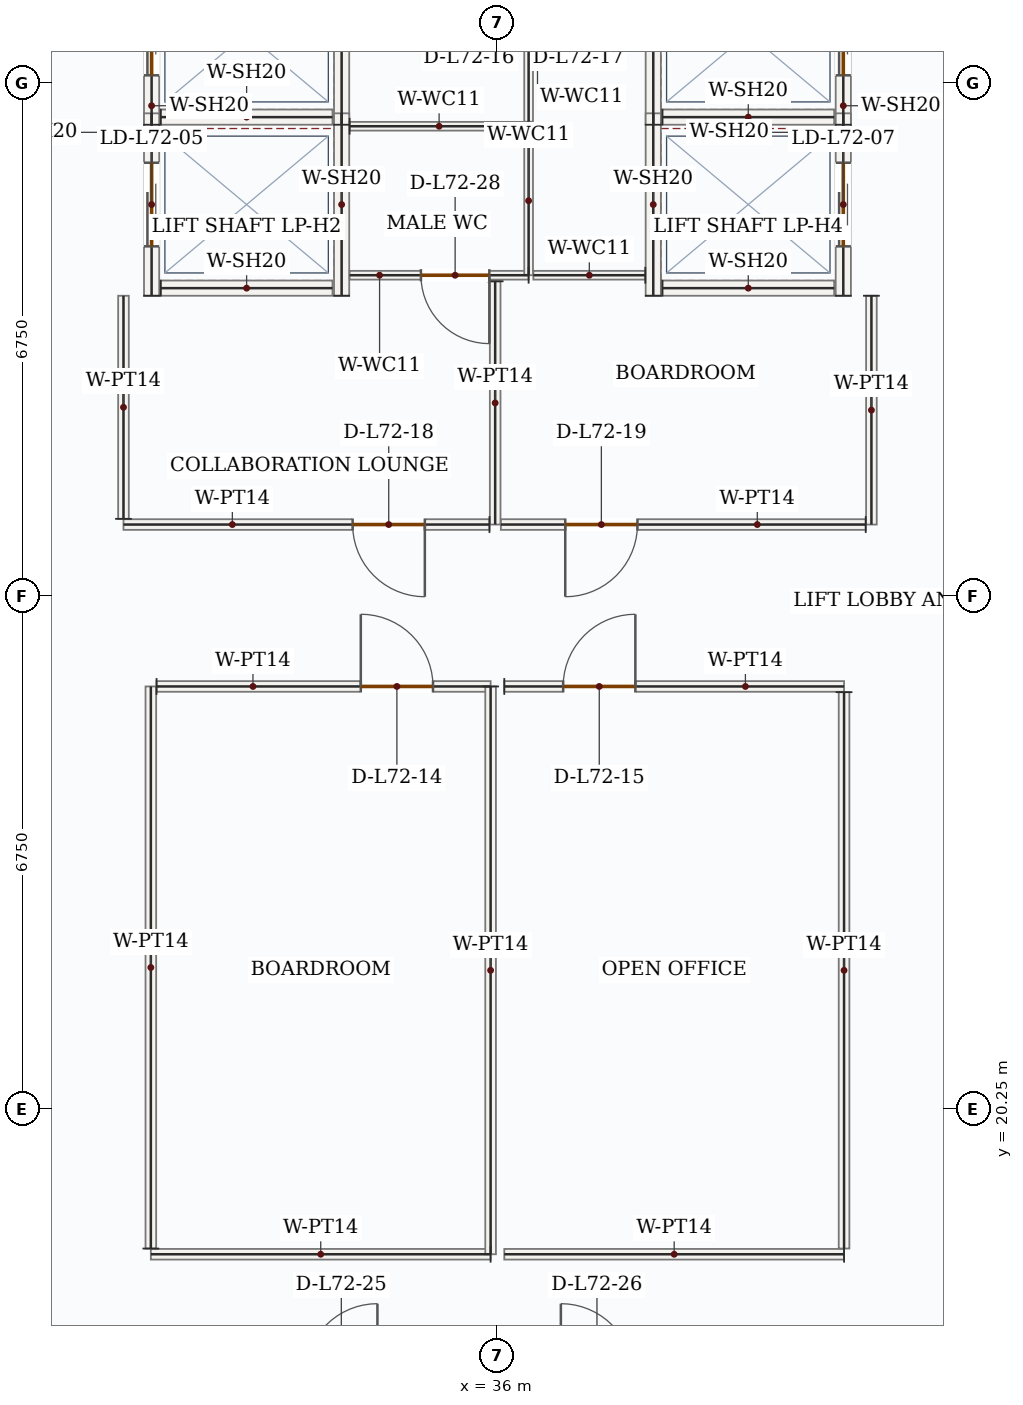
"""IFC4 building model, lengths in metres.
Left out: names, types, materials, properties, quantities, classifications, styles, units other than length and angle.
Written with IfcOpenShell. Run it as: python <this file> out.ifc"""

import sys

from ifc_helpers import new_model, si_unit, direction, frame, frame_2d, origin, place, context, subcontext, project, spatial, rectangle, extrude, source, transform, mapped, element, fill, save


model = new_model("IFC4")
c1 = context("Model", 3, precision=1e-05, world=origin(), true_north=direction((0.0, 1.0)))
c2 = subcontext(c1, "Body", "Model", "MODEL_VIEW")
j1 = project(units=[si_unit("LENGTHUNIT", "METRE"), si_unit("PLANEANGLEUNIT", "RADIAN")], contexts=[c1])
p1 = place(None, origin())
s1 = spatial("IfcSite", under=j1, at=p1, CompositionType="ELEMENT")
p2 = place(p1, origin())
s2 = spatial("IfcBuilding", under=s1, at=p2, CompositionType="ELEMENT")
p3 = place(p2, frame((0.0, 0.0, 299.1)))
s3 = spatial("IfcBuildingStorey", under=s2, at=p3, CompositionType="ELEMENT", Elevation=299.1)
p4 = place(p3, frame((31.45, 33.2, 0.0), z_axis=(0.0, 0.0, 1.0), x_axis=(0.0, 1.0, 0.0)))
e1 = element("IfcWall", 1, at=p4, inside=s3, PredefinedType="SOLIDWALL", context=c2, shape_type="SweptSolid", body=[
    extrude(rectangle(XDim=2.4, YDim=0.2, at=frame_2d((1.2, 0.0))), origin(), (0.0, 0.0, 1.0), 3.5),
])
p5 = place(p4, frame((0.65, 0.0, 0.0)))
e2 = element("IfcOpeningElement", 2, at=p5, cuts=e1, PredefinedType="OPENING", context=c2, shape_type="SweptSolid", body=[
    extrude(rectangle(XDim=1.1, YDim=2.15, at=frame_2d((0.55, 1.075))), frame((0.0, 0.11, 0.0), z_axis=(0.0, -1.0, 0.0), x_axis=(1.0, 0.0, 0.0)), (0.0, 0.0, 1.0), 0.22),
])
m1 = source(origin(), c2, "Body", "SweptSolid", [
    extrude(rectangle(XDim=2.4, YDim=0.2, at=frame_2d((1.2, 0.0))), origin(), (0.0, 0.0, 1.0), 3.5),
])
p6 = place(p3, frame((33.95, 33.2, 0.0), z_axis=(0.0, 0.0, 1.0), x_axis=(0.0, 1.0, 0.0)))
e3 = element("IfcWall", 3, at=p6, inside=s3, PredefinedType="SOLIDWALL", context=c2, shape_type="MappedRepresentation", body=[
    mapped(m1, transform((0.0, 0.0, 0.0), x_axis=(1.0, 0.0, 0.0), y_axis=(0.0, 1.0, 0.0), z_axis=(0.0, 0.0, 1.0), scale=1.0)),
])
m2 = source(origin(), c2, "Body", "SweptSolid", [
    extrude(rectangle(XDim=2.26, YDim=0.2, at=frame_2d((1.13, 0.0))), origin(), (0.0, 0.0, 1.0), 3.5),
])
p7 = place(p3, frame((31.57, 33.3, 0.0), z_axis=(0.0, 0.0, 1.0), x_axis=(1.0, 0.0, 0.0)))
e4 = element("IfcWall", 4, at=p7, inside=s3, PredefinedType="SOLIDWALL", context=c2, shape_type="MappedRepresentation", body=[
    mapped(m2, transform((0.0, 0.0, 0.0), x_axis=(1.0, 0.0, 0.0), y_axis=(0.0, 1.0, 0.0), z_axis=(0.0, 0.0, 1.0), scale=1.0)),
])
p8 = place(p3, frame((31.45, 30.95, 0.0), z_axis=(0.0, 0.0, 1.0), x_axis=(0.0, 1.0, 0.0)))
e5 = element("IfcWall", 5, at=p8, inside=s3, PredefinedType="SOLIDWALL", context=c2, shape_type="SweptSolid", body=[
    extrude(rectangle(XDim=2.4, YDim=0.2, at=frame_2d((1.2, 0.0))), origin(), (0.0, 0.0, 1.0), 3.5),
])
p9 = place(p8, frame((0.65, 0.0, 0.0)))
e6 = element("IfcOpeningElement", 6, at=p9, cuts=e5, PredefinedType="OPENING", context=c2, shape_type="SweptSolid", body=[
    extrude(rectangle(XDim=1.1, YDim=2.15, at=frame_2d((0.55, 1.075))), frame((0.0, 0.11, 0.0), z_axis=(0.0, -1.0, 0.0), x_axis=(1.0, 0.0, 0.0)), (0.0, 0.0, 1.0), 0.22),
])
p10 = place(p3, frame((33.95, 30.95, 0.0), z_axis=(0.0, 0.0, 1.0), x_axis=(0.0, 1.0, 0.0)))
e7 = element("IfcWall", 7, at=p10, inside=s3, PredefinedType="SOLIDWALL", context=c2, shape_type="MappedRepresentation", body=[
    mapped(m1, transform((0.0, 0.0, 0.0), x_axis=(1.0, 0.0, 0.0), y_axis=(0.0, 1.0, 0.0), z_axis=(0.0, 0.0, 1.0), scale=1.0)),
])
p11 = place(p3, frame((31.57, 31.05, 0.0), z_axis=(0.0, 0.0, 1.0), x_axis=(1.0, 0.0, 0.0)))
e8 = element("IfcWall", 8, at=p11, inside=s3, PredefinedType="SOLIDWALL", context=c2, shape_type="MappedRepresentation", body=[
    mapped(m2, transform((0.0, 0.0, 0.0), x_axis=(1.0, 0.0, 0.0), y_axis=(0.0, 1.0, 0.0), z_axis=(0.0, 0.0, 1.0), scale=1.0)),
])
p12 = place(p3, frame((38.05, 33.2, 0.0), z_axis=(0.0, 0.0, 1.0), x_axis=(0.0, 1.0, 0.0)))
e9 = element("IfcWall", 9, at=p12, inside=s3, PredefinedType="SOLIDWALL", context=c2, shape_type="MappedRepresentation", body=[
    mapped(m1, transform((0.0, 0.0, 0.0), x_axis=(1.0, 0.0, 0.0), y_axis=(0.0, 1.0, 0.0), z_axis=(0.0, 0.0, 1.0), scale=1.0)),
])
p13 = place(p3, frame((40.55, 33.2, 0.0), z_axis=(0.0, 0.0, 1.0), x_axis=(0.0, 1.0, 0.0)))
e10 = element("IfcWall", 10, at=p13, inside=s3, PredefinedType="SOLIDWALL", context=c2, shape_type="SweptSolid", body=[
    extrude(rectangle(XDim=2.4, YDim=0.2, at=frame_2d((1.2, 0.0))), origin(), (0.0, 0.0, 1.0), 3.5),
])
p14 = place(p13, frame((0.65, 0.0, 0.0)))
e11 = element("IfcOpeningElement", 11, at=p14, cuts=e10, PredefinedType="OPENING", context=c2, shape_type="SweptSolid", body=[
    extrude(rectangle(XDim=1.1, YDim=2.15, at=frame_2d((0.55, 1.075))), frame((0.0, 0.11, 0.0), z_axis=(0.0, -1.0, 0.0), x_axis=(1.0, 0.0, 0.0)), (0.0, 0.0, 1.0), 0.22),
])
p15 = place(p3, frame((38.17, 33.3, 0.0), z_axis=(0.0, 0.0, 1.0), x_axis=(1.0, 0.0, 0.0)))
e12 = element("IfcWall", 12, at=p15, inside=s3, PredefinedType="SOLIDWALL", context=c2, shape_type="MappedRepresentation", body=[
    mapped(m2, transform((0.0, 0.0, 0.0), x_axis=(1.0, 0.0, 0.0), y_axis=(0.0, 1.0, 0.0), z_axis=(0.0, 0.0, 1.0), scale=1.0)),
])
p16 = place(p3, frame((38.05, 30.95, 0.0), z_axis=(0.0, 0.0, 1.0), x_axis=(0.0, 1.0, 0.0)))
e13 = element("IfcWall", 13, at=p16, inside=s3, PredefinedType="SOLIDWALL", context=c2, shape_type="MappedRepresentation", body=[
    mapped(m1, transform((0.0, 0.0, 0.0), x_axis=(1.0, 0.0, 0.0), y_axis=(0.0, 1.0, 0.0), z_axis=(0.0, 0.0, 1.0), scale=1.0)),
])
p17 = place(p3, frame((40.55, 30.95, 0.0), z_axis=(0.0, 0.0, 1.0), x_axis=(0.0, 1.0, 0.0)))
e14 = element("IfcWall", 14, at=p17, inside=s3, PredefinedType="SOLIDWALL", context=c2, shape_type="SweptSolid", body=[
    extrude(rectangle(XDim=2.4, YDim=0.2, at=frame_2d((1.2, 0.0))), origin(), (0.0, 0.0, 1.0), 3.5),
])
p18 = place(p17, frame((0.65, 0.0, 0.0)))
e15 = element("IfcOpeningElement", 15, at=p18, cuts=e14, PredefinedType="OPENING", context=c2, shape_type="SweptSolid", body=[
    extrude(rectangle(XDim=1.1, YDim=2.15, at=frame_2d((0.55, 1.075))), frame((0.0, 0.11, 0.0), z_axis=(0.0, -1.0, 0.0), x_axis=(1.0, 0.0, 0.0)), (0.0, 0.0, 1.0), 0.22),
])
p19 = place(p3, frame((38.17, 31.05, 0.0), z_axis=(0.0, 0.0, 1.0), x_axis=(1.0, 0.0, 0.0)))
e16 = element("IfcWall", 16, at=p19, inside=s3, PredefinedType="SOLIDWALL", context=c2, shape_type="MappedRepresentation", body=[
    mapped(m2, transform((0.0, 0.0, 0.0), x_axis=(1.0, 0.0, 0.0), y_axis=(0.0, 1.0, 0.0), z_axis=(0.0, 0.0, 1.0), scale=1.0)),
])
p20 = place(p3, frame((36.41, 31.22, 0.0), z_axis=(0.0, 0.0, 1.0), x_axis=(-1.0, 0.0, 0.0)))
e17 = element("IfcWall", 17, at=p20, inside=s3, PredefinedType="PARTITIONING", context=c2, shape_type="SweptSolid", body=[
    extrude(rectangle(XDim=2.355, YDim=0.115, at=frame_2d((1.177, 0.0))), origin(), (0.0, 0.0, 1.0), 3.5),
])
p21 = place(p20, frame((0.517, 0.0, 0.0)))
e18 = element("IfcOpeningElement", 18, at=p21, cuts=e17, PredefinedType="OPENING", context=c2, shape_type="SweptSolid", body=[
    extrude(rectangle(XDim=0.9, YDim=2.1, at=frame_2d((0.45, 1.05))), frame((0.0, 0.067, 0.0), z_axis=(0.0, -1.0, 0.0), x_axis=(1.0, 0.0, 0.0)), (0.0, 0.0, 1.0), 0.135),
])
m3 = source(origin(), c2, "Body", "SweptSolid", [
    extrude(rectangle(XDim=2.355, YDim=0.115, at=frame_2d((1.177, 0.0))), origin(), (0.0, 0.0, 1.0), 3.5),
])
p22 = place(p3, frame((34.055, 33.18, 0.0), z_axis=(0.0, 0.0, 1.0), x_axis=(1.0, 0.0, 0.0)))
e19 = element("IfcWall", 19, at=p22, inside=s3, PredefinedType="PARTITIONING", context=c2, shape_type="MappedRepresentation", body=[
    mapped(m3, transform((0.0, 0.0, 0.0), x_axis=(1.0, 0.0, 0.0), y_axis=(0.0, 1.0, 0.0), z_axis=(0.0, 0.0, 1.0), scale=1.0)),
])
m4 = source(origin(), c2, "Body", "SweptSolid", [
    extrude(rectangle(XDim=1.96, YDim=0.115, at=frame_2d((0.98, 0.0))), origin(), (0.0, 0.0, 1.0), 3.5),
])
p23 = place(p3, frame((36.41, 33.18, 0.0), z_axis=(0.0, 0.0, 1.0), x_axis=(0.0, -1.0, 0.0)))
e20 = element("IfcWall", 20, at=p23, inside=s3, PredefinedType="PARTITIONING", context=c2, shape_type="MappedRepresentation", body=[
    mapped(m4, transform((0.0, 0.0, 0.0), x_axis=(1.0, 0.0, 0.0), y_axis=(0.0, 1.0, 0.0), z_axis=(0.0, 0.0, 1.0), scale=1.0)),
])
m5 = source(origin(), c2, "Body", "SweptSolid", [
    extrude(rectangle(XDim=2.04, YDim=0.115, at=frame_2d((1.02, 0.0))), origin(), (0.0, 0.0, 1.0), 3.5),
])
p24 = place(p3, frame((36.41, 35.28, 0.0), z_axis=(0.0, 0.0, 1.0), x_axis=(0.0, -1.0, 0.0)))
e21 = element("IfcWall", 21, at=p24, inside=s3, PredefinedType="PARTITIONING", context=c2, shape_type="MappedRepresentation", body=[
    mapped(m5, transform((0.0, 0.0, 0.0), x_axis=(1.0, 0.0, 0.0), y_axis=(0.0, 1.0, 0.0), z_axis=(0.0, 0.0, 1.0), scale=1.0)),
])
m6 = source(origin(), c2, "Body", "SweptSolid", [
    extrude(rectangle(XDim=1.473, YDim=0.115, at=frame_2d((0.736, 0.0))), origin(), (0.0, 0.0, 1.0), 3.5),
])
p25 = place(p3, frame((37.945, 31.22, 0.0), z_axis=(0.0, 0.0, 1.0), x_axis=(-1.0, 0.0, 0.0)))
e22 = element("IfcWall", 22, at=p25, inside=s3, PredefinedType="PARTITIONING", context=c2, shape_type="MappedRepresentation", body=[
    mapped(m6, transform((0.0, 0.0, 0.0), x_axis=(1.0, 0.0, 0.0), y_axis=(0.0, 1.0, 0.0), z_axis=(0.0, 0.0, 1.0), scale=1.0)),
])
m7 = source(origin(), c2, "Body", "SweptSolid", [
    extrude(rectangle(XDim=3.2, YDim=0.14, at=frame_2d((1.6, 0.0))), origin(), (0.0, 0.0, 1.0), 3.5),
])
p26 = place(p3, frame((35.97, 31.14, 0.0), z_axis=(0.0, 0.0, 1.0), x_axis=(0.0, -1.0, 0.0)))
e23 = element("IfcWall", 23, at=p26, inside=s3, PredefinedType="PARTITIONING", context=c2, shape_type="MappedRepresentation", body=[
    mapped(m7, transform((0.0, 0.0, 0.0), x_axis=(1.0, 0.0, 0.0), y_axis=(0.0, 1.0, 0.0), z_axis=(0.0, 0.0, 1.0), scale=1.0)),
])
p27 = place(p3, frame((35.895, 27.94, 0.0), z_axis=(0.0, 0.0, 1.0), x_axis=(-1.0, 0.0, 0.0)))
e24 = element("IfcWall", 24, at=p27, inside=s3, PredefinedType="PARTITIONING", context=c2, shape_type="SweptSolid", body=[
    extrude(rectangle(XDim=4.815, YDim=0.14, at=frame_2d((2.407, 0.0))), origin(), (0.0, 0.0, 1.0), 3.5),
])
p28 = place(p27, frame((0.85, 0.0, 0.0)))
e25 = element("IfcOpeningElement", 25, at=p28, cuts=e24, PredefinedType="OPENING", context=c2, shape_type="SweptSolid", body=[
    extrude(rectangle(XDim=0.95, YDim=2.15, at=frame_2d((0.475, 1.075))), frame((0.0, 0.08, 0.0), z_axis=(0.0, -1.0, 0.0), x_axis=(1.0, 0.0, 0.0)), (0.0, 0.0, 1.0), 0.16),
])
m8 = source(origin(), c2, "Body", "SweptSolid", [
    extrude(rectangle(XDim=2.935, YDim=0.14, at=frame_2d((1.468, 0.0))), origin(), (0.0, 0.0, 1.0), 3.5),
])
p29 = place(p3, frame((31.08, 28.015, 0.0), z_axis=(0.0, 0.0, 1.0), x_axis=(0.0, 1.0, 0.0)))
e26 = element("IfcWall", 26, at=p29, inside=s3, PredefinedType="PARTITIONING", context=c2, shape_type="MappedRepresentation", body=[
    mapped(m8, transform((0.0, 0.0, 0.0), x_axis=(1.0, 0.0, 0.0), y_axis=(0.0, 1.0, 0.0), z_axis=(0.0, 0.0, 1.0), scale=1.0)),
])
m9 = source(origin(), c2, "Body", "SweptSolid", [
    extrude(rectangle(XDim=3.01, YDim=0.14, at=frame_2d((1.505, 0.0))), origin(), (0.0, 0.0, 1.0), 3.5),
])
p30 = place(p3, frame((40.92, 30.95, 0.0), z_axis=(0.0, 0.0, 1.0), x_axis=(0.0, -1.0, 0.0)))
e27 = element("IfcWall", 27, at=p30, inside=s3, PredefinedType="PARTITIONING", context=c2, shape_type="MappedRepresentation", body=[
    mapped(m9, transform((0.0, 0.0, 0.0), x_axis=(1.0, 0.0, 0.0), y_axis=(0.0, 1.0, 0.0), z_axis=(0.0, 0.0, 1.0), scale=1.0)),
])
p31 = place(p3, frame((40.845, 27.94, 0.0), z_axis=(0.0, 0.0, 1.0), x_axis=(-1.0, 0.0, 0.0)))
e28 = element("IfcWall", 28, at=p31, inside=s3, PredefinedType="PARTITIONING", context=c2, shape_type="SweptSolid", body=[
    extrude(rectangle(XDim=4.8, YDim=0.14, at=frame_2d((2.4, 0.0))), origin(), (0.0, 0.0, 1.0), 3.5),
])
p32 = place(p31, frame((3.003, 0.0, 0.0)))
e29 = element("IfcOpeningElement", 29, at=p32, cuts=e28, PredefinedType="OPENING", context=c2, shape_type="SweptSolid", body=[
    extrude(rectangle(XDim=0.95, YDim=2.15, at=frame_2d((0.475, 1.075))), frame((0.0, 0.08, 0.0), z_axis=(0.0, -1.0, 0.0), x_axis=(1.0, 0.0, 0.0)), (0.0, 0.0, 1.0), 0.16),
])
m10 = source(origin(), c2, "Body", "SweptSolid", [
    extrude(rectangle(XDim=4.47, YDim=0.14, at=frame_2d((2.235, 0.0))), origin(), (0.0, 0.0, 1.0), 3.5),
])
p33 = place(p3, frame((35.91, 18.34, 0.0), z_axis=(0.0, 0.0, 1.0), x_axis=(-1.0, 0.0, 0.0)))
e30 = element("IfcWall", 30, at=p33, inside=s3, PredefinedType="PARTITIONING", context=c2, shape_type="MappedRepresentation", body=[
    mapped(m10, transform((0.0, 0.0, 0.0), x_axis=(1.0, 0.0, 0.0), y_axis=(0.0, 1.0, 0.0), z_axis=(0.0, 0.0, 1.0), scale=1.0)),
])
m11 = source(origin(), c2, "Body", "SweptSolid", [
    extrude(rectangle(XDim=7.395, YDim=0.14, at=frame_2d((3.698, 0.0))), origin(), (0.0, 0.0, 1.0), 3.5),
])
p34 = place(p3, frame((31.44, 18.415, 0.0), z_axis=(0.0, 0.0, 1.0), x_axis=(0.0, 1.0, 0.0)))
e31 = element("IfcWall", 31, at=p34, inside=s3, PredefinedType="PARTITIONING", context=c2, shape_type="MappedRepresentation", body=[
    mapped(m11, transform((0.0, 0.0, 0.0), x_axis=(1.0, 0.0, 0.0), y_axis=(0.0, 1.0, 0.0), z_axis=(0.0, 0.0, 1.0), scale=1.0)),
])
p35 = place(p3, frame((31.515, 25.81, 0.0), z_axis=(0.0, 0.0, 1.0), x_axis=(1.0, 0.0, 0.0)))
e32 = element("IfcWall", 32, at=p35, inside=s3, PredefinedType="PARTITIONING", context=c2, shape_type="SweptSolid", body=[
    extrude(rectangle(XDim=4.395, YDim=0.14, at=frame_2d((2.198, 0.0))), origin(), (0.0, 0.0, 1.0), 3.5),
])
p36 = place(p35, frame((2.687, 0.0, 0.0)))
e33 = element("IfcOpeningElement", 33, at=p36, cuts=e32, PredefinedType="OPENING", context=c2, shape_type="SweptSolid", body=[
    extrude(rectangle(XDim=0.95, YDim=2.15, at=frame_2d((0.475, 1.075))), frame((0.0, 0.08, 0.0), z_axis=(0.0, -1.0, 0.0), x_axis=(1.0, 0.0, 0.0)), (0.0, 0.0, 1.0), 0.16),
])
m12 = source(origin(), c2, "Body", "SweptSolid", [
    extrude(rectangle(XDim=7.47, YDim=0.14, at=frame_2d((3.735, 0.0))), origin(), (0.0, 0.0, 1.0), 3.5),
])
p37 = place(p3, frame((35.91, 25.81, 0.0), z_axis=(0.0, 0.0, 1.0), x_axis=(0.0, -1.0, 0.0)))
e34 = element("IfcWall", 34, at=p37, inside=s3, PredefinedType="PARTITIONING", context=c2, shape_type="MappedRepresentation", body=[
    mapped(m12, transform((0.0, 0.0, 0.0), x_axis=(1.0, 0.0, 0.0), y_axis=(0.0, 1.0, 0.0), z_axis=(0.0, 0.0, 1.0), scale=1.0)),
])
p38 = place(p3, frame((40.56, 18.34, 0.0), z_axis=(0.0, 0.0, 1.0), x_axis=(-1.0, 0.0, 0.0)))
e35 = element("IfcWall", 35, at=p38, inside=s3, PredefinedType="PARTITIONING", context=c2, shape_type="MappedRepresentation", body=[
    mapped(m10, transform((0.0, 0.0, 0.0), x_axis=(1.0, 0.0, 0.0), y_axis=(0.0, 1.0, 0.0), z_axis=(0.0, 0.0, 1.0), scale=1.0)),
])
p39 = place(p3, frame((36.09, 25.81, 0.0), z_axis=(0.0, 0.0, 1.0), x_axis=(1.0, 0.0, 0.0)))
e36 = element("IfcWall", 36, at=p39, inside=s3, PredefinedType="PARTITIONING", context=c2, shape_type="SweptSolid", body=[
    extrude(rectangle(XDim=4.47, YDim=0.14, at=frame_2d((2.235, 0.0))), origin(), (0.0, 0.0, 1.0), 3.5),
])
p40 = place(p39, frame((0.774, 0.0, 0.0)))
e37 = element("IfcOpeningElement", 37, at=p40, cuts=e36, PredefinedType="OPENING", context=c2, shape_type="SweptSolid", body=[
    extrude(rectangle(XDim=0.95, YDim=2.15, at=frame_2d((0.475, 1.075))), frame((0.0, 0.08, 0.0), z_axis=(0.0, -1.0, 0.0), x_axis=(1.0, 0.0, 0.0)), (0.0, 0.0, 1.0), 0.16),
])
m13 = source(origin(), c2, "Body", "SweptSolid", [
    extrude(rectangle(XDim=7.32, YDim=0.14, at=frame_2d((3.66, 0.0))), origin(), (0.0, 0.0, 1.0), 3.5),
])
p41 = place(p3, frame((40.56, 25.735, 0.0), z_axis=(0.0, 0.0, 1.0), x_axis=(0.0, -1.0, 0.0)))
e38 = element("IfcWall", 38, at=p41, inside=s3, PredefinedType="PARTITIONING", context=c2, shape_type="MappedRepresentation", body=[
    mapped(m13, transform((0.0, 0.0, 0.0), x_axis=(1.0, 0.0, 0.0), y_axis=(0.0, 1.0, 0.0), z_axis=(0.0, 0.0, 1.0), scale=1.0)),
])
m14 = source(origin(), c2, "Body", "SweptSolid", [
    extrude(rectangle(XDim=1.1, YDim=2.15, at=frame_2d((0.55, 1.075))), frame((0.0, 0.025, 0.0), z_axis=(0.0, -1.0, 0.0), x_axis=(1.0, 0.0, 0.0)), (0.0, 0.0, 1.0), 0.05),
])
p42 = place(p5, origin())
e39 = element("IfcDoor", 39, at=p42, inside=s3, OperationType="DOUBLE_DOOR_SLIDING", PredefinedType="DOOR", context=c2, shape_type="MappedRepresentation", body=[
    mapped(m14, transform((0.0, 0.0, 0.0), x_axis=(1.0, 0.0, 0.0), y_axis=(0.0, 1.0, 0.0), z_axis=(0.0, 0.0, 1.0), scale=1.0)),
])
fill(e2, e39)
p43 = place(p9, origin())
e40 = element("IfcDoor", 40, at=p43, inside=s3, OperationType="DOUBLE_DOOR_SLIDING", PredefinedType="DOOR", context=c2, shape_type="MappedRepresentation", body=[
    mapped(m14, transform((0.0, 0.0, 0.0), x_axis=(1.0, 0.0, 0.0), y_axis=(0.0, 1.0, 0.0), z_axis=(0.0, 0.0, 1.0), scale=1.0)),
])
fill(e6, e40)
p44 = place(p14, origin())
e41 = element("IfcDoor", 41, at=p44, inside=s3, OperationType="DOUBLE_DOOR_SLIDING", PredefinedType="DOOR", context=c2, shape_type="MappedRepresentation", body=[
    mapped(m14, transform((0.0, 0.0, 0.0), x_axis=(1.0, 0.0, 0.0), y_axis=(0.0, 1.0, 0.0), z_axis=(0.0, 0.0, 1.0), scale=1.0)),
])
fill(e11, e41)
p45 = place(p18, origin())
e42 = element("IfcDoor", 42, at=p45, inside=s3, OperationType="DOUBLE_DOOR_SLIDING", PredefinedType="DOOR", context=c2, shape_type="MappedRepresentation", body=[
    mapped(m14, transform((0.0, 0.0, 0.0), x_axis=(1.0, 0.0, 0.0), y_axis=(0.0, 1.0, 0.0), z_axis=(0.0, 0.0, 1.0), scale=1.0)),
])
fill(e15, e42)
m15 = source(origin(), c2, "Body", "SweptSolid", [
    extrude(rectangle(XDim=0.95, YDim=2.15, at=frame_2d((0.475, 1.075))), frame((0.0, 0.025, 0.0), z_axis=(0.0, -1.0, 0.0), x_axis=(1.0, 0.0, 0.0)), (0.0, 0.0, 1.0), 0.05),
])
p46 = place(p36, origin())
e43 = element("IfcDoor", 43, at=p46, inside=s3, OperationType="SINGLE_SWING_LEFT", PredefinedType="DOOR", context=c2, shape_type="MappedRepresentation", body=[
    mapped(m15, transform((0.0, 0.0, 0.0), x_axis=(1.0, 0.0, 0.0), y_axis=(0.0, 1.0, 0.0), z_axis=(0.0, 0.0, 1.0), scale=1.0)),
])
fill(e33, e43)
p47 = place(p40, origin())
e44 = element("IfcDoor", 44, at=p47, inside=s3, OperationType="SINGLE_SWING_RIGHT", PredefinedType="DOOR", context=c2, shape_type="MappedRepresentation", body=[
    mapped(m15, transform((0.0, 0.0, 0.0), x_axis=(1.0, 0.0, 0.0), y_axis=(0.0, 1.0, 0.0), z_axis=(0.0, 0.0, 1.0), scale=1.0)),
])
fill(e37, e44)
p48 = place(p28, origin())
e45 = element("IfcDoor", 45, at=p48, inside=s3, OperationType="SINGLE_SWING_LEFT", PredefinedType="DOOR", context=c2, shape_type="MappedRepresentation", body=[
    mapped(m15, transform((0.0, 0.0, 0.0), x_axis=(1.0, 0.0, 0.0), y_axis=(0.0, 1.0, 0.0), z_axis=(0.0, 0.0, 1.0), scale=1.0)),
])
fill(e25, e45)
p49 = place(p32, origin())
e46 = element("IfcDoor", 46, at=p49, inside=s3, OperationType="SINGLE_SWING_RIGHT", PredefinedType="DOOR", context=c2, shape_type="MappedRepresentation", body=[
    mapped(m15, transform((0.0, 0.0, 0.0), x_axis=(1.0, 0.0, 0.0), y_axis=(0.0, 1.0, 0.0), z_axis=(0.0, 0.0, 1.0), scale=1.0)),
])
fill(e29, e46)
m16 = source(origin(), c2, "Body", "SweptSolid", [
    extrude(rectangle(XDim=0.9, YDim=2.1, at=frame_2d((0.45, 1.05))), frame((0.0, 0.025, 0.0), z_axis=(0.0, -1.0, 0.0), x_axis=(1.0, 0.0, 0.0)), (0.0, 0.0, 1.0), 0.05),
])
p50 = place(p21, origin())
e47 = element("IfcDoor", 47, at=p50, inside=s3, OperationType="SINGLE_SWING_LEFT", PredefinedType="DOOR", context=c2, shape_type="MappedRepresentation", body=[
    mapped(m16, transform((0.0, 0.0, 0.0), x_axis=(1.0, 0.0, 0.0), y_axis=(0.0, 1.0, 0.0), z_axis=(0.0, 0.0, 1.0), scale=1.0)),
])
fill(e18, e47)
save(model, sys.argv[1])
